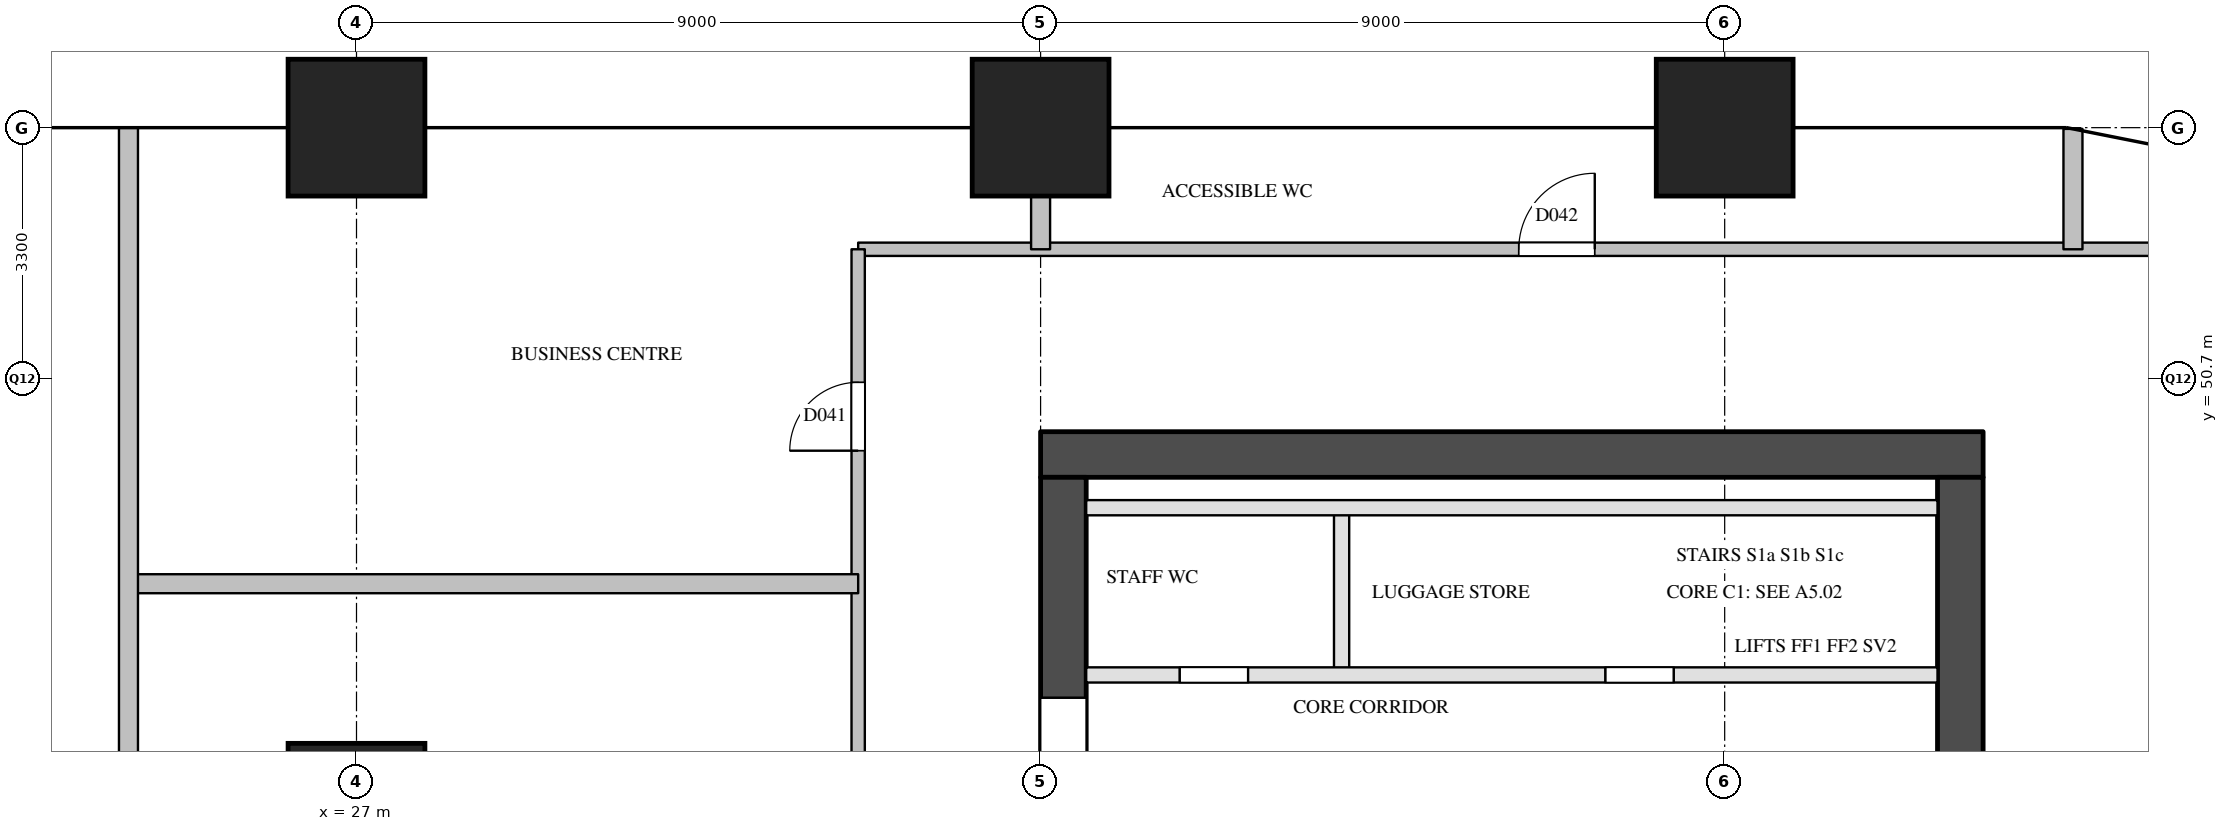
"""IFC4 building model, lengths in metres.
Left out: names, types, materials, properties, quantities, classifications, styles, units other than length and angle.
Written with IfcOpenShell. Run it as: python <this file> out.ifc"""

import sys

from ifc_helpers import new_model, si_unit, direction, frame, frame_2d, origin, origin_2d, place, context, subcontext, project, spatial, rectangle, extrude, element, fill, save


model = new_model("IFC4")
c1 = context("Model", 3, precision=1e-05, world=origin(), true_north=direction((0.0, 1.0)))
c2 = subcontext(c1, "Body", "Model", "MODEL_VIEW")
j1 = project(units=[si_unit("LENGTHUNIT", "METRE"), si_unit("PLANEANGLEUNIT", "RADIAN")], contexts=[c1])
p1 = place(None, origin())
s1 = spatial("IfcSite", under=j1, at=p1, CompositionType="ELEMENT")
p2 = place(p1, origin())
s2 = spatial("IfcBuilding", under=s1, at=p2, CompositionType="ELEMENT")
p3 = place(p2, frame((0.0, 0.0, 38.6)))
s3 = spatial("IfcBuildingStorey", under=s2, at=p3, CompositionType="ELEMENT", Elevation=38.6)
for number, where, z_axis, x_axis in (
    (1, (27.0, 45.0, 0.0), (0.0, 0.0, 1.0), (1.0, 0.0, 0.0)),
    (2, (27.0, 54.0, 0.0), (0.0, 0.0, 1.0), (1.0, 0.0, 0.0)),
    (3, (36.0, 54.0, 0.0), (0.0, 0.0, 1.0), (1.0, 0.0, 0.0)),
    (4, (45.0, 54.0, 0.0), (0.0, 0.0, 1.0), (1.0, 0.0, 0.0)),
):
    element("IfcColumn", number, at=place(p3, frame(where, z_axis=z_axis, x_axis=x_axis)), inside=s3, PredefinedType="COLUMN", context=c2, shape_type="SweptSolid", body=[
        extrude(rectangle(XDim=1.8, YDim=1.8, at=origin_2d()), origin(), (0.0, 0.0, 1.0), 3.8),
    ])
p4 = place(p3, frame((36.0, 49.7, 0.0), z_axis=(0.0, 0.0, 1.0), x_axis=(1.0, 0.0, 0.0)))
e5 = element("IfcWall", 5, at=p4, inside=s3, PredefinedType="SHEAR", context=c2, shape_type="SweptSolid", body=[
    extrude(rectangle(XDim=12.4, YDim=0.6, at=frame_2d((6.2, 0.0))), origin(), (0.0, 0.0, 1.0), 3.5),
])
p5 = place(p3, frame((36.3, 29.1, 0.0), z_axis=(0.0, 0.0, 1.0), x_axis=(0.0, 1.0, 0.0)))
e6 = element("IfcWall", 6, at=p5, inside=s3, PredefinedType="SHEAR", context=c2, shape_type="SweptSolid", body=[
    extrude(rectangle(XDim=20.3, YDim=0.6, at=frame_2d((10.15, 0.0))), origin(), (0.0, 0.0, 1.0), 3.5),
])
p6 = place(p5, frame((3.6, 0.0, 0.0)))
e7 = element("IfcOpeningElement", 7, at=p6, cuts=e6, PredefinedType="OPENING", context=c2, shape_type="SweptSolid", body=[
    extrude(rectangle(XDim=1.8, YDim=2.1, at=frame_2d((0.9, 1.05))), frame((0.0, 0.31, 0.0), z_axis=(0.0, -1.0, 0.0), x_axis=(1.0, 0.0, 0.0)), (0.0, 0.0, 1.0), 0.62),
])
p7 = place(p5, frame((16.4, 0.0, 0.0)))
e8 = element("IfcOpeningElement", 8, at=p7, cuts=e6, PredefinedType="OPENING", context=c2, shape_type="SweptSolid", body=[
    extrude(rectangle(XDim=1.0, YDim=2.1, at=frame_2d((0.5, 1.05))), frame((0.0, 0.31, 0.0), z_axis=(0.0, -1.0, 0.0), x_axis=(1.0, 0.0, 0.0)), (0.0, 0.0, 1.0), 0.62),
])
p8 = place(p3, frame((48.1, 29.1, 0.0), z_axis=(0.0, 0.0, 1.0), x_axis=(0.0, 1.0, 0.0)))
e9 = element("IfcWall", 9, at=p8, inside=s3, PredefinedType="SHEAR", context=c2, shape_type="SweptSolid", body=[
    extrude(rectangle(XDim=20.3, YDim=0.6, at=frame_2d((10.15, 0.0))), origin(), (0.0, 0.0, 1.0), 3.5),
])
p9 = place(p8, frame((12.5, 0.0, 0.0)))
e10 = element("IfcOpeningElement", 10, at=p9, cuts=e9, PredefinedType="OPENING", context=c2, shape_type="SweptSolid", body=[
    extrude(rectangle(XDim=0.7, YDim=2.1, at=frame_2d((0.35, 1.05))), frame((0.0, 0.31, 0.0), z_axis=(0.0, -1.0, 0.0), x_axis=(1.0, 0.0, 0.0)), (0.0, 0.0, 1.0), 0.62),
])
p10 = place(p8, frame((3.9, 0.0, 0.0)))
e11 = element("IfcOpeningElement", 11, at=p10, cuts=e9, PredefinedType="OPENING", context=c2, shape_type="SweptSolid", body=[
    extrude(rectangle(XDim=1.8, YDim=2.1, at=frame_2d((0.9, 1.05))), frame((0.0, 0.31, 0.0), z_axis=(0.0, -1.0, 0.0), x_axis=(1.0, 0.0, 0.0)), (0.0, 0.0, 1.0), 0.62),
])
p11 = place(p3, frame((39.96, 46.8, 0.0), z_axis=(0.0, 0.0, 1.0), x_axis=(0.0, 1.0, 0.0)))
e12 = element("IfcWall", 12, at=p11, inside=s3, PredefinedType="PARTITIONING", context=c2, shape_type="SweptSolid", body=[
    extrude(rectangle(XDim=2.2, YDim=0.2, at=frame_2d((1.1, 0.0))), origin(), (0.0, 0.0, 1.0), 3.5),
])
p12 = place(p3, frame((36.6, 46.8, 0.0), z_axis=(0.0, 0.0, 1.0), x_axis=(1.0, 0.0, 0.0)))
e13 = element("IfcWall", 13, at=p12, inside=s3, PredefinedType="PARTITIONING", context=c2, shape_type="SweptSolid", body=[
    extrude(rectangle(XDim=11.2, YDim=0.2, at=frame_2d((5.6, 0.0))), origin(), (0.0, 0.0, 1.0), 3.5),
])
p13 = place(p12, frame((1.23, 0.0, 0.0)))
e14 = element("IfcOpeningElement", 14, at=p13, cuts=e13, PredefinedType="OPENING", context=c2, shape_type="SweptSolid", body=[
    extrude(rectangle(XDim=0.9, YDim=2.1, at=frame_2d((0.45, 1.05))), frame((0.0, 0.11, 0.0), z_axis=(0.0, -1.0, 0.0), x_axis=(1.0, 0.0, 0.0)), (0.0, 0.0, 1.0), 0.22),
])
p14 = place(p12, frame((6.83, 0.0, 0.0)))
e15 = element("IfcOpeningElement", 15, at=p14, cuts=e13, PredefinedType="OPENING", context=c2, shape_type="SweptSolid", body=[
    extrude(rectangle(XDim=0.9, YDim=2.1, at=frame_2d((0.45, 1.05))), frame((0.0, 0.11, 0.0), z_axis=(0.0, -1.0, 0.0), x_axis=(1.0, 0.0, 0.0)), (0.0, 0.0, 1.0), 0.22),
])
p15 = place(p3, frame((36.6, 49.0, 0.0), z_axis=(0.0, 0.0, 1.0), x_axis=(1.0, 0.0, 0.0)))
e16 = element("IfcWall", 16, at=p15, inside=s3, PredefinedType="PARTITIONING", context=c2, shape_type="SweptSolid", body=[
    extrude(rectangle(XDim=11.2, YDim=0.2, at=frame_2d((5.6, 0.0))), origin(), (0.0, 0.0, 1.0), 3.5),
])
p16 = place(p3, frame((33.6, 52.4, 0.0), z_axis=(0.0, 0.0, 1.0), x_axis=(1.0, 0.0, 0.0)))
e17 = element("IfcWall", 17, at=p16, inside=s3, PredefinedType="PARTITIONING", context=c2, shape_type="SweptSolid", body=[
    extrude(rectangle(XDim=17.2, YDim=0.175, at=frame_2d((8.6, 0.0))), origin(), (0.0, 0.0, 1.0), 3.5),
])
p17 = place(p16, frame((8.691, 0.0, 0.0)))
e18 = element("IfcOpeningElement", 18, at=p17, cuts=e17, PredefinedType="OPENING", context=c2, shape_type="SweptSolid", body=[
    extrude(rectangle(XDim=1.0, YDim=2.1, at=frame_2d((0.5, 1.05))), frame((0.0, 0.097, 0.0), z_axis=(0.0, -1.0, 0.0), x_axis=(1.0, 0.0, 0.0)), (0.0, 0.0, 1.0), 0.195),
])
p18 = place(p3, frame((33.6, 39.75, 0.0), z_axis=(0.0, 0.0, 1.0), x_axis=(0.0, 1.0, 0.0)))
e19 = element("IfcWall", 19, at=p18, inside=s3, PredefinedType="PARTITIONING", context=c2, shape_type="SweptSolid", body=[
    extrude(rectangle(XDim=12.65, YDim=0.175, at=frame_2d((6.325, 0.0))), origin(), (0.0, 0.0, 1.0), 3.5),
])
p19 = place(p18, frame((10.0, 0.0, 0.0)))
e20 = element("IfcOpeningElement", 20, at=p19, cuts=e19, PredefinedType="OPENING", context=c2, shape_type="SweptSolid", body=[
    extrude(rectangle(XDim=0.9, YDim=2.1, at=frame_2d((0.45, 1.05))), frame((0.0, 0.097, 0.0), z_axis=(0.0, -1.0, 0.0), x_axis=(1.0, 0.0, 0.0)), (0.0, 0.0, 1.0), 0.195),
])
p20 = place(p3, frame((24.0, 48.0, 0.0), z_axis=(0.0, 0.0, 1.0), x_axis=(1.0, 0.0, 0.0)))
e21 = element("IfcWall", 21, at=p20, inside=s3, PredefinedType="PARTITIONING", context=c2, shape_type="SweptSolid", body=[
    extrude(rectangle(XDim=9.6, YDim=0.25, at=frame_2d((4.8, 0.0))), origin(), (0.0, 0.0, 1.0), 2.5),
])
p21 = place(p3, frame((24.0, 39.75, 0.0), z_axis=(0.0, 0.0, 1.0), x_axis=(0.0, 1.0, 0.0)))
e22 = element("IfcWall", 22, at=p21, inside=s3, PredefinedType="PARTITIONING", context=c2, shape_type="SweptSolid", body=[
    extrude(rectangle(XDim=14.25, YDim=0.25, at=frame_2d((7.125, 0.0))), origin(), (0.0, 0.0, 1.0), 2.5),
])
p22 = place(p3, frame((36.0, 52.4, 0.0), z_axis=(0.0, 0.0, 1.0), x_axis=(0.0, 1.0, 0.0)))
e23 = element("IfcWall", 23, at=p22, inside=s3, PredefinedType="PARTITIONING", context=c2, shape_type="SweptSolid", body=[
    extrude(rectangle(XDim=1.6, YDim=0.25, at=frame_2d((0.8, 0.0))), origin(), (0.0, 0.0, 1.0), 3.5),
])
p23 = place(p3, frame((49.582, 52.4, 0.0), z_axis=(0.0, 0.0, 1.0), x_axis=(0.0, 1.0, 0.0)))
e24 = element("IfcWall", 24, at=p23, inside=s3, PredefinedType="PARTITIONING", context=c2, shape_type="SweptSolid", body=[
    extrude(rectangle(XDim=1.584, YDim=0.25, at=frame_2d((0.792, 0.0))), origin(), (0.0, 0.0, 1.0), 2.5),
])
p24 = place(p7, origin())
e25 = element("IfcDoor", 25, at=p24, inside=s3, OperationType="SINGLE_SWING_RIGHT", PredefinedType="DOOR", context=c2, shape_type="SweptSolid", body=[
    extrude(rectangle(XDim=1.0, YDim=2.1, at=frame_2d((0.5, 1.05))), frame((0.0, 0.025, 0.0), z_axis=(0.0, -1.0, 0.0), x_axis=(1.0, 0.0, 0.0)), (0.0, 0.0, 1.0), 0.05),
])
fill(e8, e25)
p25 = place(p13, origin())
e26 = element("IfcDoor", 26, at=p25, inside=s3, OperationType="SINGLE_SWING_LEFT", PredefinedType="DOOR", context=c2, shape_type="SweptSolid", body=[
    extrude(rectangle(XDim=0.9, YDim=2.1, at=frame_2d((0.45, 1.05))), frame((0.0, 0.025, 0.0), z_axis=(0.0, -1.0, 0.0), x_axis=(1.0, 0.0, 0.0)), (0.0, 0.0, 1.0), 0.05),
])
fill(e14, e26)
p26 = place(p14, origin())
e27 = element("IfcDoor", 27, at=p26, inside=s3, OperationType="SINGLE_SWING_RIGHT", PredefinedType="DOOR", context=c2, shape_type="SweptSolid", body=[
    extrude(rectangle(XDim=0.9, YDim=2.1, at=frame_2d((0.45, 1.05))), frame((0.0, 0.025, 0.0), z_axis=(0.0, -1.0, 0.0), x_axis=(1.0, 0.0, 0.0)), (0.0, 0.0, 1.0), 0.05),
])
fill(e15, e27)
p27 = place(p19, origin())
e28 = element("IfcDoor", 28, at=p27, inside=s3, OperationType="SINGLE_SWING_LEFT", PredefinedType="DOOR", context=c2, shape_type="SweptSolid", body=[
    extrude(rectangle(XDim=0.9, YDim=2.1, at=frame_2d((0.45, 1.05))), frame((0.0, 0.025, 0.0), z_axis=(0.0, -1.0, 0.0), x_axis=(1.0, 0.0, 0.0)), (0.0, 0.0, 1.0), 0.05),
])
fill(e20, e28)
p28 = place(p17, origin())
e29 = element("IfcDoor", 29, at=p28, inside=s3, OperationType="SINGLE_SWING_RIGHT", PredefinedType="DOOR", context=c2, shape_type="SweptSolid", body=[
    extrude(rectangle(XDim=1.0, YDim=2.1, at=frame_2d((0.5, 1.05))), frame((0.0, 0.025, 0.0), z_axis=(0.0, -1.0, 0.0), x_axis=(1.0, 0.0, 0.0)), (0.0, 0.0, 1.0), 0.05),
])
fill(e18, e29)
save(model, sys.argv[1])
